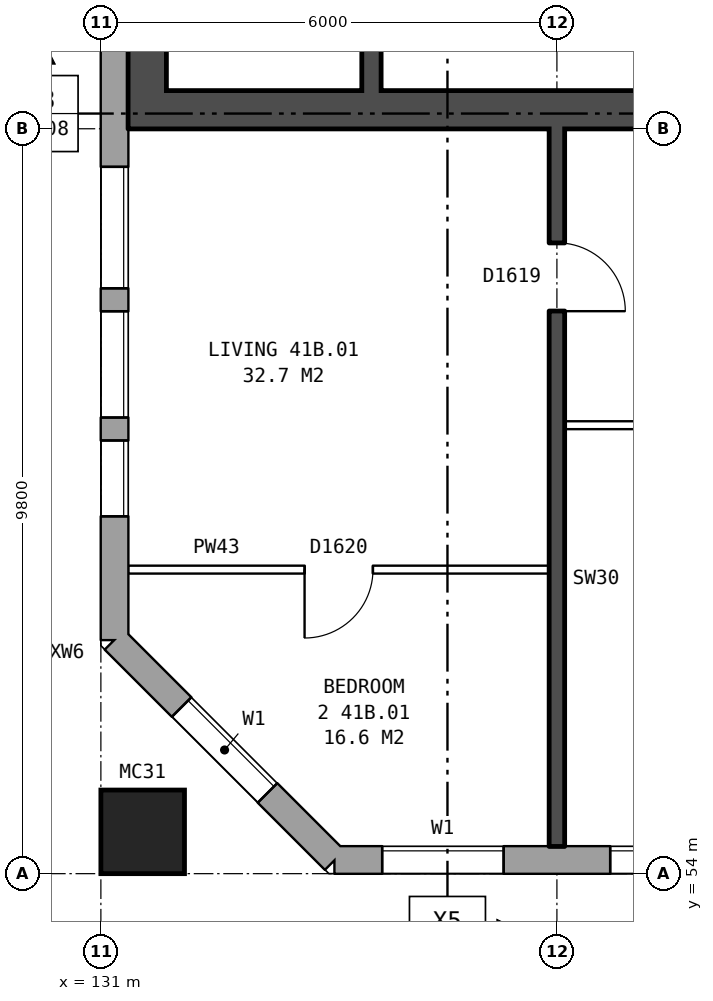
"""IFC4 building model, lengths in metres.
Left out: names, types, materials, properties, quantities, classifications, styles, units other than length and angle.
Written with IfcOpenShell. Run it as: python <this file> out.ifc"""

import sys

from ifc_helpers import new_model, si_unit, direction, frame, frame_2d, origin, origin_2d, place, context, subcontext, project, spatial, rectangle, hollow_rectangle, extrude, element, fill, save


model = new_model("IFC4")
c1 = context("Model", 3, precision=1e-05, world=origin(), true_north=direction((0.0, 1.0)))
c2 = subcontext(c1, "Body", "Model", "MODEL_VIEW")
j1 = project(units=[si_unit("LENGTHUNIT", "METRE"), si_unit("PLANEANGLEUNIT", "RADIAN")], contexts=[c1])
p1 = place(None, origin())
s1 = spatial("IfcSite", under=j1, at=p1, CompositionType="ELEMENT")
p2 = place(p1, origin())
s2 = spatial("IfcBuilding", under=s1, at=p2, CompositionType="ELEMENT")
p3 = place(p2, frame((0.0, 0.0, 148.5)))
s3 = spatial("IfcBuildingStorey", under=s2, at=p3, CompositionType="ELEMENT", Elevation=148.5)
p4 = place(p3, frame((131.55, 54.55, 0.0), z_axis=(0.0, 0.0, 1.0), x_axis=(1.0, 0.0, 0.0)))
e1 = element("IfcColumn", 1, at=p4, inside=s3, PredefinedType="COLUMN", context=c2, shape_type="SweptSolid", body=[
    extrude(hollow_rectangle(XDim=1.1, YDim=1.1, WallThickness=0.06, at=origin_2d()), origin(), (0.0, 0.0, 1.0), 3.1),
])
p5 = place(p3, frame((131.18, 57.075, 0.0), z_axis=(0.0, 0.0, 1.0), x_axis=(0.707106781187, -0.707106781187, 0.0)))
e2 = element("IfcWall", 2, at=p5, inside=s3, PredefinedType="STANDARD", context=c2, shape_type="SweptSolid", body=[
    extrude(rectangle(XDim=4.094, YDim=0.36, at=frame_2d((2.047, 0.0))), origin(), (0.0, 0.0, 1.0), 2.85),
])
p6 = place(p5, frame((1.247, 0.0, 0.8)))
e3 = element("IfcOpeningElement", 3, at=p6, cuts=e2, PredefinedType="OPENING", context=c2, shape_type="SweptSolid", body=[
    extrude(rectangle(XDim=1.6, YDim=1.8, at=frame_2d((0.8, 0.9))), frame((0.0, 0.19, 0.0), z_axis=(0.0, -1.0, 0.0), x_axis=(1.0, 0.0, 0.0)), (0.0, 0.0, 1.0), 0.38),
])
p7 = place(p3, frame((134.075, 54.18, 0.0), z_axis=(0.0, 0.0, 1.0), x_axis=(1.0, 0.0, 0.0)))
e4 = element("IfcWall", 4, at=p7, inside=s3, PredefinedType="STANDARD", context=c2, shape_type="SweptSolid", body=[
    extrude(rectangle(XDim=34.351, YDim=0.36, at=frame_2d((17.175, 0.0))), origin(), (0.0, 0.0, 1.0), 2.85),
])
p8 = place(p7, frame((0.625, 0.0, 0.8)))
e5 = element("IfcOpeningElement", 5, at=p8, cuts=e4, PredefinedType="OPENING", context=c2, shape_type="SweptSolid", body=[
    extrude(rectangle(XDim=1.6, YDim=1.8, at=frame_2d((0.8, 0.9))), frame((0.0, 0.19, 0.0), z_axis=(0.0, -1.0, 0.0), x_axis=(1.0, 0.0, 0.0)), (0.0, 0.0, 1.0), 0.38),
])
p9 = place(p7, frame((3.625, 0.0, 0.8)))
e6 = element("IfcOpeningElement", 6, at=p9, cuts=e4, PredefinedType="OPENING", context=c2, shape_type="SweptSolid", body=[
    extrude(rectangle(XDim=1.6, YDim=1.8, at=frame_2d((0.8, 0.9))), frame((0.0, 0.19, 0.0), z_axis=(0.0, -1.0, 0.0), x_axis=(1.0, 0.0, 0.0)), (0.0, 0.0, 1.0), 0.38),
])
p10 = place(p7, frame((6.625, 0.0, 0.8)))
e7 = element("IfcOpeningElement", 7, at=p10, cuts=e4, PredefinedType="OPENING", context=c2, shape_type="SweptSolid", body=[
    extrude(rectangle(XDim=1.6, YDim=1.8, at=frame_2d((0.8, 0.9))), frame((0.0, 0.19, 0.0), z_axis=(0.0, -1.0, 0.0), x_axis=(1.0, 0.0, 0.0)), (0.0, 0.0, 1.0), 0.38),
])
p11 = place(p7, frame((9.625, 0.0, 0.8)))
e8 = element("IfcOpeningElement", 8, at=p11, cuts=e4, PredefinedType="OPENING", context=c2, shape_type="SweptSolid", body=[
    extrude(rectangle(XDim=1.6, YDim=1.8, at=frame_2d((0.8, 0.9))), frame((0.0, 0.19, 0.0), z_axis=(0.0, -1.0, 0.0), x_axis=(1.0, 0.0, 0.0)), (0.0, 0.0, 1.0), 0.38),
])
p12 = place(p7, frame((12.625, 0.0, 0.8)))
e9 = element("IfcOpeningElement", 9, at=p12, cuts=e4, PredefinedType="OPENING", context=c2, shape_type="SweptSolid", body=[
    extrude(rectangle(XDim=1.6, YDim=1.8, at=frame_2d((0.8, 0.9))), frame((0.0, 0.19, 0.0), z_axis=(0.0, -1.0, 0.0), x_axis=(1.0, 0.0, 0.0)), (0.0, 0.0, 1.0), 0.38),
])
p13 = place(p7, frame((15.625, 0.0, 0.8)))
e10 = element("IfcOpeningElement", 10, at=p13, cuts=e4, PredefinedType="OPENING", context=c2, shape_type="SweptSolid", body=[
    extrude(rectangle(XDim=1.6, YDim=1.8, at=frame_2d((0.8, 0.9))), frame((0.0, 0.19, 0.0), z_axis=(0.0, -1.0, 0.0), x_axis=(1.0, 0.0, 0.0)), (0.0, 0.0, 1.0), 0.38),
])
p14 = place(p7, frame((18.625, 0.0, 0.8)))
e11 = element("IfcOpeningElement", 11, at=p14, cuts=e4, PredefinedType="OPENING", context=c2, shape_type="SweptSolid", body=[
    extrude(rectangle(XDim=1.6, YDim=1.8, at=frame_2d((0.8, 0.9))), frame((0.0, 0.19, 0.0), z_axis=(0.0, -1.0, 0.0), x_axis=(1.0, 0.0, 0.0)), (0.0, 0.0, 1.0), 0.38),
])
p15 = place(p7, frame((21.625, 0.0, 0.8)))
e12 = element("IfcOpeningElement", 12, at=p15, cuts=e4, PredefinedType="OPENING", context=c2, shape_type="SweptSolid", body=[
    extrude(rectangle(XDim=1.6, YDim=1.8, at=frame_2d((0.8, 0.9))), frame((0.0, 0.19, 0.0), z_axis=(0.0, -1.0, 0.0), x_axis=(1.0, 0.0, 0.0)), (0.0, 0.0, 1.0), 0.38),
])
p16 = place(p7, frame((24.625, 0.0, 0.8)))
e13 = element("IfcOpeningElement", 13, at=p16, cuts=e4, PredefinedType="OPENING", context=c2, shape_type="SweptSolid", body=[
    extrude(rectangle(XDim=1.6, YDim=1.8, at=frame_2d((0.8, 0.9))), frame((0.0, 0.19, 0.0), z_axis=(0.0, -1.0, 0.0), x_axis=(1.0, 0.0, 0.0)), (0.0, 0.0, 1.0), 0.38),
])
p17 = place(p7, frame((27.625, 0.0, 0.8)))
e14 = element("IfcOpeningElement", 14, at=p17, cuts=e4, PredefinedType="OPENING", context=c2, shape_type="SweptSolid", body=[
    extrude(rectangle(XDim=1.6, YDim=1.8, at=frame_2d((0.8, 0.9))), frame((0.0, 0.19, 0.0), z_axis=(0.0, -1.0, 0.0), x_axis=(1.0, 0.0, 0.0)), (0.0, 0.0, 1.0), 0.38),
])
p18 = place(p7, frame((30.625, 0.0, 0.8)))
e15 = element("IfcOpeningElement", 15, at=p18, cuts=e4, PredefinedType="OPENING", context=c2, shape_type="SweptSolid", body=[
    extrude(rectangle(XDim=1.6, YDim=1.8, at=frame_2d((0.8, 0.9))), frame((0.0, 0.19, 0.0), z_axis=(0.0, -1.0, 0.0), x_axis=(1.0, 0.0, 0.0)), (0.0, 0.0, 1.0), 0.38),
])
p19 = place(p3, frame((131.18, 82.925, 0.0), z_axis=(0.0, 0.0, 1.0), x_axis=(0.0, -1.0, 0.0)))
e16 = element("IfcWall", 16, at=p19, inside=s3, PredefinedType="STANDARD", context=c2, shape_type="SweptSolid", body=[
    extrude(rectangle(XDim=25.851, YDim=0.36, at=frame_2d((12.925, 0.0))), origin(), (0.0, 0.0, 1.0), 2.85),
])
p20 = place(p19, frame((1.375, 0.0, 0.8)))
e17 = element("IfcOpeningElement", 17, at=p20, cuts=e16, PredefinedType="OPENING", context=c2, shape_type="SweptSolid", body=[
    extrude(rectangle(XDim=1.0, YDim=1.2, at=frame_2d((0.5, 0.6))), frame((0.0, 0.19, 0.0), z_axis=(0.0, -1.0, 0.0), x_axis=(1.0, 0.0, 0.0)), (0.0, 0.0, 1.0), 0.38),
])
p21 = place(p19, frame((4.625, 0.0, 0.8)))
e18 = element("IfcOpeningElement", 18, at=p21, cuts=e16, PredefinedType="OPENING", context=c2, shape_type="SweptSolid", body=[
    extrude(rectangle(XDim=1.6, YDim=1.8, at=frame_2d((0.8, 0.9))), frame((0.0, 0.19, 0.0), z_axis=(0.0, -1.0, 0.0), x_axis=(1.0, 0.0, 0.0)), (0.0, 0.0, 1.0), 0.38),
])
p22 = place(p19, frame((19.625, 0.0, 0.8)))
e19 = element("IfcOpeningElement", 19, at=p22, cuts=e16, PredefinedType="OPENING", context=c2, shape_type="SweptSolid", body=[
    extrude(rectangle(XDim=1.6, YDim=1.8, at=frame_2d((0.8, 0.9))), frame((0.0, 0.19, 0.0), z_axis=(0.0, -1.0, 0.0), x_axis=(1.0, 0.0, 0.0)), (0.0, 0.0, 1.0), 0.38),
])
p23 = place(p19, frame((21.525, 0.0, 0.8)))
e20 = element("IfcOpeningElement", 20, at=p23, cuts=e16, PredefinedType="OPENING", context=c2, shape_type="SweptSolid", body=[
    extrude(rectangle(XDim=1.4, YDim=1.8, at=frame_2d((0.7, 0.9))), frame((0.0, 0.19, 0.0), z_axis=(0.0, -1.0, 0.0), x_axis=(1.0, 0.0, 0.0)), (0.0, 0.0, 1.0), 0.38),
])
p24 = place(p19, frame((2.675, 0.0, 0.8)))
e21 = element("IfcOpeningElement", 21, at=p24, cuts=e16, PredefinedType="OPENING", context=c2, shape_type="SweptSolid", body=[
    extrude(rectangle(XDim=1.4, YDim=1.8, at=frame_2d((0.7, 0.9))), frame((0.0, 0.19, 0.0), z_axis=(0.0, -1.0, 0.0), x_axis=(1.0, 0.0, 0.0)), (0.0, 0.0, 1.0), 0.38),
])
p25 = place(p19, frame((23.225, 0.0, 0.8)))
e22 = element("IfcOpeningElement", 22, at=p25, cuts=e16, PredefinedType="OPENING", context=c2, shape_type="SweptSolid", body=[
    extrude(rectangle(XDim=1.0, YDim=1.2, at=frame_2d((0.5, 0.6))), frame((0.0, 0.19, 0.0), z_axis=(0.0, -1.0, 0.0), x_axis=(1.0, 0.0, 0.0)), (0.0, 0.0, 1.0), 0.38),
])
p26 = place(p3, frame((131.61, 63.8, 0.0), z_axis=(0.0, 0.0, 1.0), x_axis=(0.0, 1.0, 0.0)))
e23 = element("IfcWall", 23, at=p26, inside=s3, PredefinedType="SHEAR", context=c2, shape_type="SweptSolid", body=[
    extrude(rectangle(XDim=12.4, YDim=0.5, at=frame_2d((6.2, 0.0))), origin(), (0.0, 0.0, 1.0), 2.85),
])
p27 = place(p3, frame((139.26, 64.05, 0.0), z_axis=(0.0, 0.0, 1.0), x_axis=(-1.0, 0.0, 0.0)))
e24 = element("IfcWall", 24, at=p27, inside=s3, PredefinedType="SHEAR", context=c2, shape_type="SweptSolid", body=[
    extrude(rectangle(XDim=7.4, YDim=0.5, at=frame_2d((3.7, 0.0))), origin(), (0.0, 0.0, 1.0), 2.85),
])
p28 = place(p3, frame((134.56, 64.3, 0.0), z_axis=(0.0, 0.0, 1.0), x_axis=(0.0, 1.0, 0.0)))
e25 = element("IfcWall", 25, at=p28, inside=s3, PredefinedType="SHEAR", context=c2, shape_type="SweptSolid", body=[
    extrude(rectangle(XDim=6.825, YDim=0.25, at=frame_2d((3.413, 0.0))), origin(), (0.0, 0.0, 1.0), 2.85),
])
p29 = place(p3, frame((131.36, 58.0, 0.0), z_axis=(0.0, 0.0, 1.0), x_axis=(1.0, 0.0, 0.0)))
e26 = element("IfcWall", 26, at=p29, inside=s3, PredefinedType="PARTITIONING", context=c2, shape_type="SweptSolid", body=[
    extrude(rectangle(XDim=5.54, YDim=0.1, at=frame_2d((2.77, 0.0))), origin(), (0.0, 0.0, 1.0), 2.85),
])
p30 = place(p29, frame((2.32, 0.0, 0.0)))
e27 = element("IfcOpeningElement", 27, at=p30, cuts=e26, PredefinedType="OPENING", context=c2, shape_type="SweptSolid", body=[
    extrude(rectangle(XDim=0.9, YDim=2.1, at=frame_2d((0.45, 1.05))), frame((0.0, 0.06, 0.0), z_axis=(0.0, -1.0, 0.0), x_axis=(1.0, 0.0, 0.0)), (0.0, 0.0, 1.0), 0.12),
])
p31 = place(p3, frame((137.1, 59.9, 0.0), z_axis=(0.0, 0.0, 1.0), x_axis=(1.0, 0.0, 0.0)))
e28 = element("IfcWall", 28, at=p31, inside=s3, PredefinedType="PARTITIONING", context=c2, shape_type="SweptSolid", body=[
    extrude(rectangle(XDim=5.8, YDim=0.1, at=frame_2d((2.9, 0.0))), origin(), (0.0, 0.0, 1.0), 2.85),
])
p32 = place(p31, frame((1.3, 0.0, 0.0)))
e29 = element("IfcOpeningElement", 29, at=p32, cuts=e28, PredefinedType="OPENING", context=c2, shape_type="SweptSolid", body=[
    extrude(rectangle(XDim=0.9, YDim=2.1, at=frame_2d((0.45, 1.05))), frame((0.0, 0.06, 0.0), z_axis=(0.0, -1.0, 0.0), x_axis=(1.0, 0.0, 0.0)), (0.0, 0.0, 1.0), 0.12),
])
p33 = place(p31, frame((4.2, 0.0, 0.0)))
e30 = element("IfcOpeningElement", 30, at=p33, cuts=e28, PredefinedType="OPENING", context=c2, shape_type="SweptSolid", body=[
    extrude(rectangle(XDim=0.9, YDim=2.1, at=frame_2d((0.45, 1.05))), frame((0.0, 0.06, 0.0), z_axis=(0.0, -1.0, 0.0), x_axis=(1.0, 0.0, 0.0)), (0.0, 0.0, 1.0), 0.12),
])
p34 = place(p3, frame((137.0, 54.36, 0.0), z_axis=(0.0, 0.0, 1.0), x_axis=(0.0, 1.0, 0.0)))
e31 = element("IfcWall", 31, at=p34, inside=s3, PredefinedType="SOLIDWALL", context=c2, shape_type="SweptSolid", body=[
    extrude(rectangle(XDim=9.44, YDim=0.2, at=frame_2d((4.72, 0.0))), origin(), (0.0, 0.0, 1.0), 2.85),
])
p35 = place(p34, frame((7.04, 0.0, 0.0)))
e32 = element("IfcOpeningElement", 32, at=p35, cuts=e31, PredefinedType="OPENING", context=c2, shape_type="SweptSolid", body=[
    extrude(rectangle(XDim=0.9, YDim=2.1, at=frame_2d((0.45, 1.05))), frame((0.0, 0.11, 0.0), z_axis=(0.0, -1.0, 0.0), x_axis=(1.0, 0.0, 0.0)), (0.0, 0.0, 1.0), 0.22),
])
p36 = place(p6, origin())
e33 = element("IfcWindow", 33, at=p36, inside=s3, PartitioningType="SINGLE_PANEL", PredefinedType="WINDOW", context=c2, shape_type="SweptSolid", body=[
    extrude(rectangle(XDim=1.6, YDim=1.8, at=frame_2d((0.8, 0.9))), frame((0.0, 0.15, 0.0), z_axis=(0.0, -1.0, 0.0), x_axis=(1.0, 0.0, 0.0)), (0.0, 0.0, 1.0), 0.06),
])
fill(e3, e33)
p37 = place(p8, origin())
e34 = element("IfcWindow", 34, at=p37, inside=s3, PartitioningType="SINGLE_PANEL", PredefinedType="WINDOW", context=c2, shape_type="SweptSolid", body=[
    extrude(rectangle(XDim=1.6, YDim=1.8, at=frame_2d((0.8, 0.9))), frame((0.0, 0.15, 0.0), z_axis=(0.0, -1.0, 0.0), x_axis=(1.0, 0.0, 0.0)), (0.0, 0.0, 1.0), 0.06),
])
fill(e5, e34)
p38 = place(p9, origin())
e35 = element("IfcWindow", 35, at=p38, inside=s3, PartitioningType="SINGLE_PANEL", PredefinedType="WINDOW", context=c2, shape_type="SweptSolid", body=[
    extrude(rectangle(XDim=1.6, YDim=1.8, at=frame_2d((0.8, 0.9))), frame((0.0, 0.15, 0.0), z_axis=(0.0, -1.0, 0.0), x_axis=(1.0, 0.0, 0.0)), (0.0, 0.0, 1.0), 0.06),
])
fill(e6, e35)
p39 = place(p22, origin())
e36 = element("IfcWindow", 36, at=p39, inside=s3, PartitioningType="SINGLE_PANEL", PredefinedType="WINDOW", context=c2, shape_type="SweptSolid", body=[
    extrude(rectangle(XDim=1.6, YDim=1.8, at=frame_2d((0.8, 0.9))), frame((0.0, 0.15, 0.0), z_axis=(0.0, -1.0, 0.0), x_axis=(1.0, 0.0, 0.0)), (0.0, 0.0, 1.0), 0.06),
])
fill(e19, e36)
p40 = place(p23, origin())
e37 = element("IfcWindow", 37, at=p40, inside=s3, PartitioningType="SINGLE_PANEL", PredefinedType="WINDOW", context=c2, shape_type="SweptSolid", body=[
    extrude(rectangle(XDim=1.4, YDim=1.8, at=frame_2d((0.7, 0.9))), frame((0.0, 0.15, 0.0), z_axis=(0.0, -1.0, 0.0), x_axis=(1.0, 0.0, 0.0)), (0.0, 0.0, 1.0), 0.06),
])
fill(e20, e37)
p41 = place(p30, frame((0.9, 0.0, 0.0), z_axis=(0.0, 0.0, 1.0), x_axis=(-1.0, 0.0, 0.0)))
e38 = element("IfcDoor", 38, at=p41, inside=s3, OperationType="SINGLE_SWING_RIGHT", PredefinedType="DOOR", context=c2, shape_type="SweptSolid", body=[
    extrude(rectangle(XDim=0.9, YDim=2.1, at=frame_2d((0.45, 1.05))), frame((0.0, 0.025, 0.0), z_axis=(0.0, -1.0, 0.0), x_axis=(1.0, 0.0, 0.0)), (0.0, 0.0, 1.0), 0.05),
])
fill(e27, e38)
p42 = place(p35, frame((0.9, 0.0, 0.0), z_axis=(0.0, 0.0, 1.0), x_axis=(-1.0, 0.0, 0.0)))
e39 = element("IfcDoor", 39, at=p42, inside=s3, OperationType="SINGLE_SWING_RIGHT", PredefinedType="DOOR", context=c2, shape_type="SweptSolid", body=[
    extrude(rectangle(XDim=0.9, YDim=2.1, at=frame_2d((0.45, 1.05))), frame((0.0, 0.025, 0.0), z_axis=(0.0, -1.0, 0.0), x_axis=(1.0, 0.0, 0.0)), (0.0, 0.0, 1.0), 0.05),
])
fill(e32, e39)
p43 = place(p25, origin())
e40 = element("IfcWindow", 40, at=p43, inside=s3, PartitioningType="SINGLE_PANEL", PredefinedType="WINDOW", context=c2, shape_type="SweptSolid", body=[
    extrude(rectangle(XDim=1.0, YDim=1.2, at=frame_2d((0.5, 0.6))), frame((0.0, 0.15, 0.0), z_axis=(0.0, -1.0, 0.0), x_axis=(1.0, 0.0, 0.0)), (0.0, 0.0, 1.0), 0.06),
])
fill(e22, e40)
save(model, sys.argv[1])
